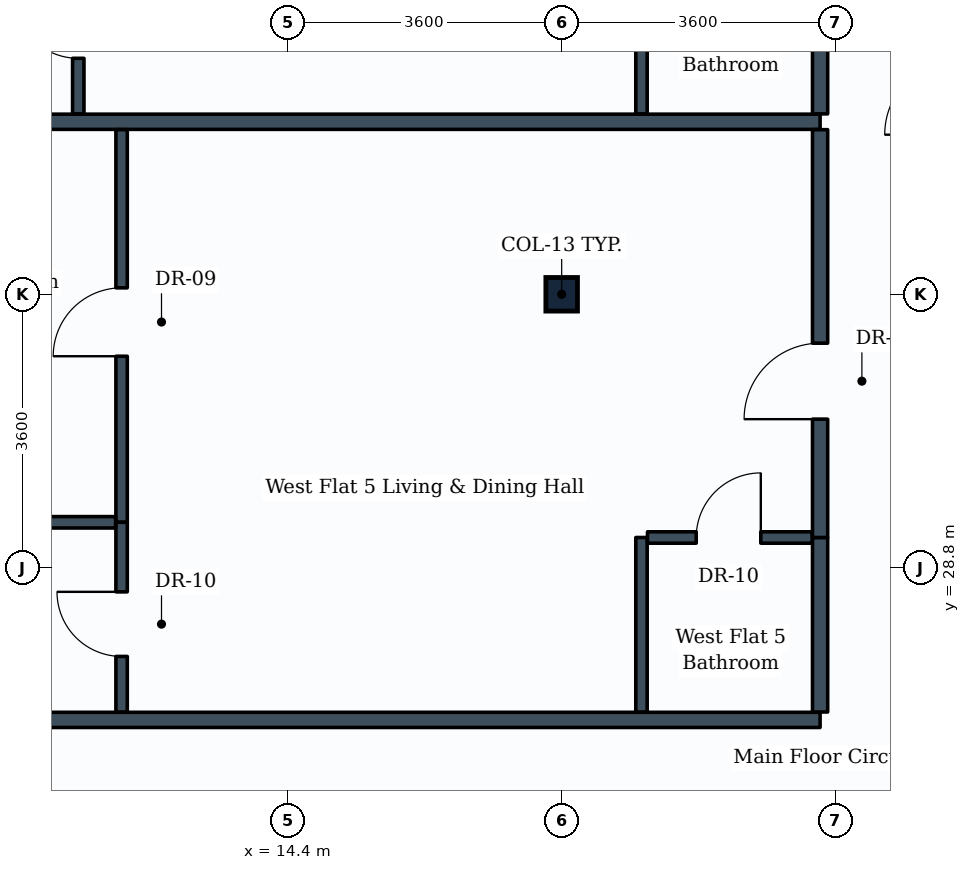
"""IFC4 building model, lengths in metres.
Left out: names, types, materials, properties, quantities, classifications, styles, units other than length and angle.
Written with IfcOpenShell. Run it as: python <this file> out.ifc"""

import sys

from ifc_helpers import new_model, si_unit, direction, frame, frame_2d, origin, origin_2d, place, context, subcontext, project, spatial, rectangle, i_section, extrude, element, fill, save


model = new_model("IFC4")
c1 = context("Model", 3, precision=1e-05, world=origin(), true_north=direction((0.0, 1.0)))
c2 = subcontext(c1, "Body", "Model", "MODEL_VIEW")
j1 = project(units=[si_unit("LENGTHUNIT", "METRE"), si_unit("PLANEANGLEUNIT", "RADIAN")], contexts=[c1])
p1 = place(None, origin())
s1 = spatial("IfcSite", under=j1, at=p1, CompositionType="ELEMENT")
p2 = place(p1, origin())
s2 = spatial("IfcBuilding", under=s1, at=p2, CompositionType="ELEMENT")
p3 = place(p2, frame((0.0, 0.0, 139.0)))
s3 = spatial("IfcBuildingStorey", under=s2, at=p3, CompositionType="ELEMENT", Elevation=139.0)
p4 = place(p3, frame((18.0, 32.4, 0.0), z_axis=(0.0, 0.0, 1.0), x_axis=(1.0, 0.0, 0.0)))
e1 = element("IfcColumn", 1, at=p4, inside=s3, PredefinedType="COLUMN", context=c2, shape_type="SweptSolid", body=[
    extrude(i_section(OverallWidth=0.416, OverallDepth=0.442, WebThickness=0.025, FlangeThickness=0.041, FilletRadius=0.015, at=origin_2d()), origin(), (0.0, 0.0, 1.0), 3.8),
])
for number, where, z_axis, x_axis in (
    (2, (7.354, 26.8, 0.0), (0.0, 0.0, 1.0), (1.0, 0.0, 0.0)),
    (3, (7.354, 34.67, 0.0), (0.0, 0.0, 1.0), (1.0, 0.0, 0.0)),
):
    element("IfcWall", number, at=place(p3, frame(where, z_axis=z_axis, x_axis=x_axis)), inside=s3, PredefinedType="PARTITIONING", context=c2, shape_type="SweptSolid", body=[
        extrude(rectangle(XDim=14.046, YDim=0.2, at=frame_2d((7.023, 0.0))), origin(), (0.0, 0.0, 1.0), 2.93),
    ])
p5 = place(p3, frame((21.4, 26.904, 0.0), z_axis=(0.0, 0.0, 1.0), x_axis=(0.0, 1.0, 0.0)))
e4 = element("IfcWall", 4, at=p5, inside=s3, PredefinedType="PARTITIONING", context=c2, shape_type="SweptSolid", body=[
    extrude(rectangle(XDim=2.296, YDim=0.2, at=frame_2d((1.148, 0.0))), origin(), (0.0, 0.0, 1.0), 3.13),
])
p6 = place(p3, frame((19.05, 26.904, 0.0), z_axis=(0.0, 0.0, 1.0), x_axis=(0.0, 1.0, 0.0)))
e5 = element("IfcWall", 5, at=p6, inside=s3, PredefinedType="PARTITIONING", context=c2, shape_type="SweptSolid", body=[
    extrude(rectangle(XDim=2.296, YDim=0.15, at=frame_2d((1.148, 0.0))), origin(), (0.0, 0.0, 1.0), 3.17),
])
p7 = place(p3, frame((19.129, 29.2, 0.0), z_axis=(0.0, 0.0, 1.0), x_axis=(1.0, 0.0, 0.0)))
e6 = element("IfcWall", 6, at=p7, inside=s3, PredefinedType="PARTITIONING", context=c2, shape_type="SweptSolid", body=[
    extrude(rectangle(XDim=2.167, YDim=0.15, at=frame_2d((1.083, 0.0))), origin(), (0.0, 0.0, 1.0), 3.535),
])
p8 = place(p7, frame((0.641, 0.0, 0.0)))
e7 = element("IfcOpeningElement", 7, at=p8, cuts=e6, PredefinedType="OPENING", context=c2, shape_type="SweptSolid", body=[
    extrude(rectangle(XDim=0.85, YDim=2.1, at=frame_2d((0.425, 1.05))), frame((0.0, 0.085, 0.0), z_axis=(0.0, -1.0, 0.0), x_axis=(1.0, 0.0, 0.0)), (0.0, 0.0, 1.0), 0.17),
])
p9 = place(p3, frame((21.4, 29.2, 0.0), z_axis=(0.0, 0.0, 1.0), x_axis=(0.0, 1.0, 0.0)))
e8 = element("IfcWall", 8, at=p9, inside=s3, PredefinedType="PARTITIONING", context=c2, shape_type="SweptSolid", body=[
    extrude(rectangle(XDim=5.366, YDim=0.2, at=frame_2d((2.683, 0.0))), origin(), (0.0, 0.0, 1.0), 3.13),
])
p10 = place(p9, frame((1.557, 0.0, 0.0)))
e9 = element("IfcOpeningElement", 9, at=p10, cuts=e8, PredefinedType="OPENING", context=c2, shape_type="SweptSolid", body=[
    extrude(rectangle(XDim=1.0, YDim=2.1, at=frame_2d((0.5, 1.05))), frame((0.0, 0.11, 0.0), z_axis=(0.0, -1.0, 0.0), x_axis=(1.0, 0.0, 0.0)), (0.0, 0.0, 1.0), 0.22),
])
p11 = place(p3, frame((12.21, 29.4, 0.0), z_axis=(0.0, 0.0, 1.0), x_axis=(0.0, 1.0, 0.0)))
e10 = element("IfcWall", 10, at=p11, inside=s3, PredefinedType="PARTITIONING", context=c2, shape_type="SweptSolid", body=[
    extrude(rectangle(XDim=5.166, YDim=0.15, at=frame_2d((2.583, 0.0))), origin(), (0.0, 0.0, 1.0), 3.18),
])
p12 = place(p11, frame((2.185, 0.0, 0.0)))
e11 = element("IfcOpeningElement", 11, at=p12, cuts=e10, PredefinedType="OPENING", context=c2, shape_type="SweptSolid", body=[
    extrude(rectangle(XDim=0.9, YDim=2.1, at=frame_2d((0.45, 1.05))), frame((0.0, 0.085, 0.0), z_axis=(0.0, -1.0, 0.0), x_axis=(1.0, 0.0, 0.0)), (0.0, 0.0, 1.0), 0.17),
])
p13 = place(p3, frame((12.21, 26.904, 0.0), z_axis=(0.0, 0.0, 1.0), x_axis=(0.0, 1.0, 0.0)))
e12 = element("IfcWall", 12, at=p13, inside=s3, PredefinedType="PARTITIONING", context=c2, shape_type="SweptSolid", body=[
    extrude(rectangle(XDim=2.496, YDim=0.15, at=frame_2d((1.248, 0.0))), origin(), (0.0, 0.0, 1.0), 3.17),
])
p14 = place(p13, frame((0.731, 0.0, 0.0)))
e13 = element("IfcOpeningElement", 13, at=p14, cuts=e12, PredefinedType="OPENING", context=c2, shape_type="SweptSolid", body=[
    extrude(rectangle(XDim=0.85, YDim=2.1, at=frame_2d((0.425, 1.05))), frame((0.0, 0.085, 0.0), z_axis=(0.0, -1.0, 0.0), x_axis=(1.0, 0.0, 0.0)), (0.0, 0.0, 1.0), 0.17),
])
p15 = place(p3, frame((7.354, 29.4, 0.0), z_axis=(0.0, 0.0, 1.0), x_axis=(1.0, 0.0, 0.0)))
e14 = element("IfcWall", 14, at=p15, inside=s3, PredefinedType="PARTITIONING", context=c2, shape_type="SweptSolid", body=[
    extrude(rectangle(XDim=4.777, YDim=0.15, at=frame_2d((2.389, 0.0))), origin(), (0.0, 0.0, 1.0), 2.93),
])
p16 = place(p3, frame((21.4, 34.774, 0.0), z_axis=(0.0, 0.0, 1.0), x_axis=(0.0, 1.0, 0.0)))
e15 = element("IfcWall", 15, at=p16, inside=s3, PredefinedType="PARTITIONING", context=c2, shape_type="SweptSolid", body=[
    extrude(rectangle(XDim=2.296, YDim=0.2, at=frame_2d((1.148, 0.0))), origin(), (0.0, 0.0, 1.0), 3.17),
])
p17 = place(p3, frame((19.05, 34.774, 0.0), z_axis=(0.0, 0.0, 1.0), x_axis=(0.0, 1.0, 0.0)))
e16 = element("IfcWall", 16, at=p17, inside=s3, PredefinedType="PARTITIONING", context=c2, shape_type="SweptSolid", body=[
    extrude(rectangle(XDim=2.296, YDim=0.15, at=frame_2d((1.148, 0.0))), origin(), (0.0, 0.0, 1.0), 3.17),
])
p18 = place(p3, frame((11.64, 34.774, 0.0), z_axis=(0.0, 0.0, 1.0), x_axis=(0.0, 1.0, 0.0)))
e17 = element("IfcWall", 17, at=p18, inside=s3, PredefinedType="PARTITIONING", context=c2, shape_type="SweptSolid", body=[
    extrude(rectangle(XDim=2.496, YDim=0.15, at=frame_2d((1.248, 0.0))), origin(), (0.0, 0.0, 1.0), 3.17),
])
p19 = place(p18, frame((0.731, 0.0, 0.0)))
e18 = element("IfcOpeningElement", 18, at=p19, cuts=e17, PredefinedType="OPENING", context=c2, shape_type="SweptSolid", body=[
    extrude(rectangle(XDim=0.85, YDim=2.1, at=frame_2d((0.425, 1.05))), frame((0.0, 0.085, 0.0), z_axis=(0.0, -1.0, 0.0), x_axis=(1.0, 0.0, 0.0)), (0.0, 0.0, 1.0), 0.17),
])
p20 = place(p8, origin())
e19 = element("IfcDoor", 19, at=p20, inside=s3, OperationType="SINGLE_SWING_RIGHT", PredefinedType="DOOR", context=c2, shape_type="SweptSolid", body=[
    extrude(rectangle(XDim=0.85, YDim=2.1, at=frame_2d((0.425, 1.05))), frame((0.0, 0.025, 0.0), z_axis=(0.0, -1.0, 0.0), x_axis=(1.0, 0.0, 0.0)), (0.0, 0.0, 1.0), 0.05),
])
fill(e7, e19)
p21 = place(p10, origin())
e20 = element("IfcDoor", 20, at=p21, inside=s3, OperationType="SINGLE_SWING_LEFT", PredefinedType="DOOR", context=c2, shape_type="SweptSolid", body=[
    extrude(rectangle(XDim=1.0, YDim=2.1, at=frame_2d((0.5, 1.05))), frame((0.0, 0.025, 0.0), z_axis=(0.0, -1.0, 0.0), x_axis=(1.0, 0.0, 0.0)), (0.0, 0.0, 1.0), 0.05),
])
fill(e9, e20)
p22 = place(p12, origin())
e21 = element("IfcDoor", 21, at=p22, inside=s3, OperationType="SINGLE_SWING_LEFT", PredefinedType="DOOR", context=c2, shape_type="SweptSolid", body=[
    extrude(rectangle(XDim=0.9, YDim=2.1, at=frame_2d((0.45, 1.05))), frame((0.0, 0.025, 0.0), z_axis=(0.0, -1.0, 0.0), x_axis=(1.0, 0.0, 0.0)), (0.0, 0.0, 1.0), 0.05),
])
fill(e11, e21)
p23 = place(p14, origin())
e22 = element("IfcDoor", 22, at=p23, inside=s3, OperationType="SINGLE_SWING_RIGHT", PredefinedType="DOOR", context=c2, shape_type="SweptSolid", body=[
    extrude(rectangle(XDim=0.85, YDim=2.1, at=frame_2d((0.425, 1.05))), frame((0.0, 0.025, 0.0), z_axis=(0.0, -1.0, 0.0), x_axis=(1.0, 0.0, 0.0)), (0.0, 0.0, 1.0), 0.05),
])
fill(e13, e22)
p24 = place(p19, origin())
e23 = element("IfcDoor", 23, at=p24, inside=s3, OperationType="SINGLE_SWING_RIGHT", PredefinedType="DOOR", context=c2, shape_type="SweptSolid", body=[
    extrude(rectangle(XDim=0.85, YDim=2.1, at=frame_2d((0.425, 1.05))), frame((0.0, 0.025, 0.0), z_axis=(0.0, -1.0, 0.0), x_axis=(1.0, 0.0, 0.0)), (0.0, 0.0, 1.0), 0.05),
])
fill(e18, e23)
save(model, sys.argv[1])
